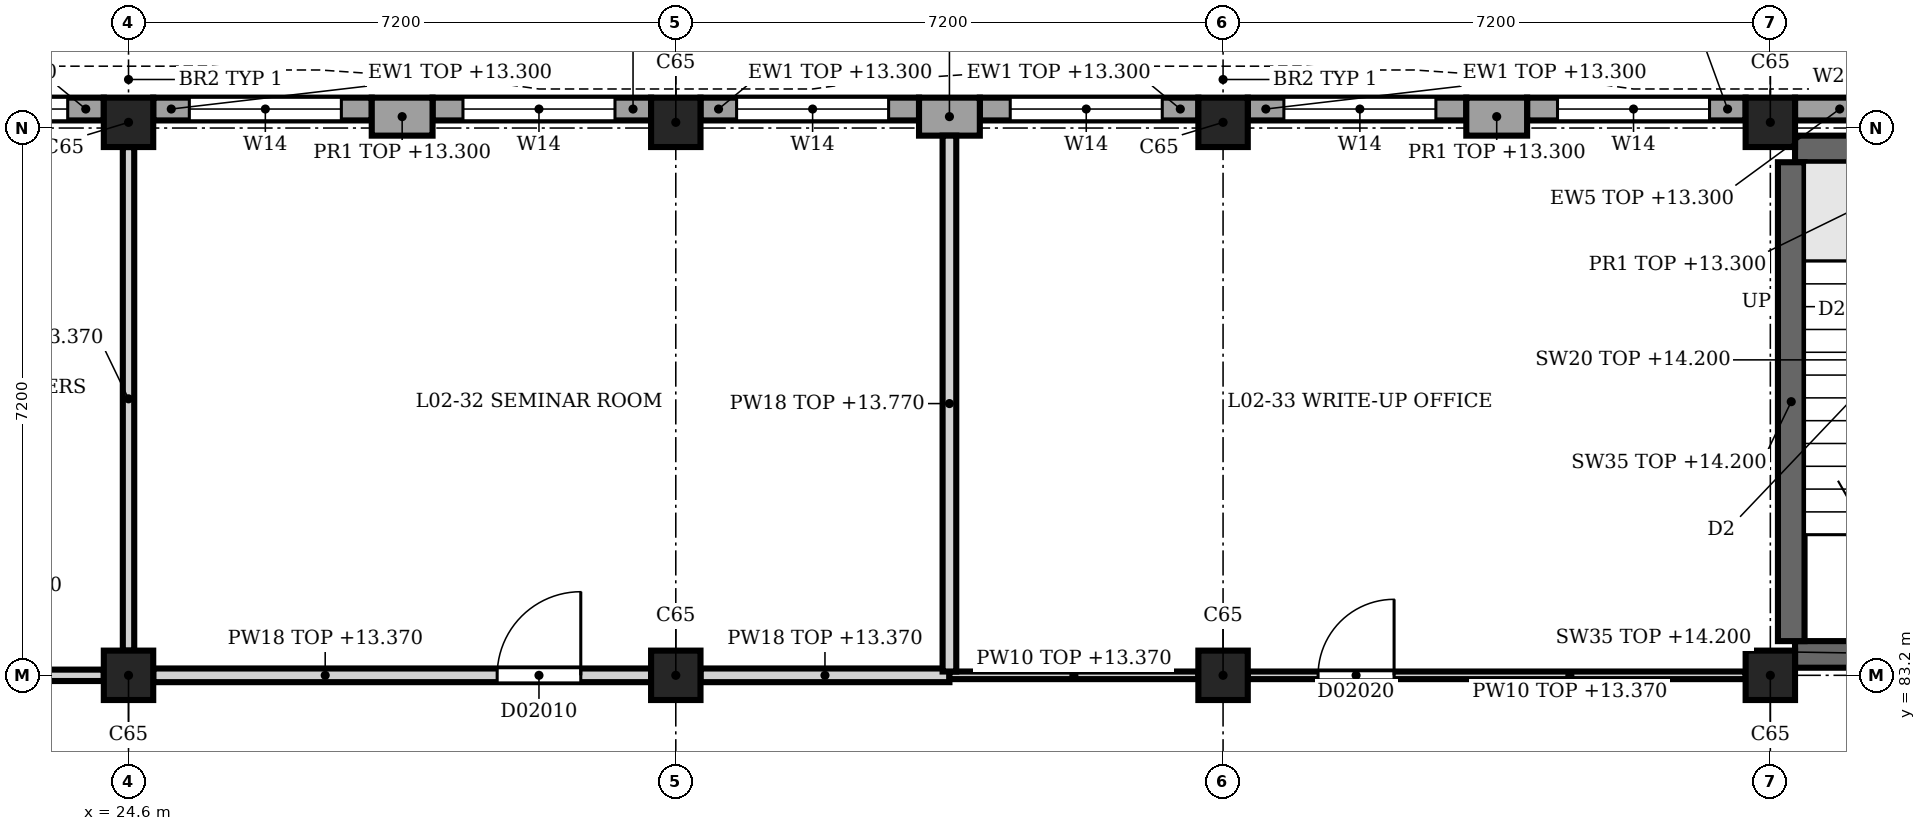
"""IFC4 building model, lengths in metres.
Left out: names, types, materials, properties, quantities, classifications, styles, units other than length and angle.
Written with IfcOpenShell. Run it as: python <this file> out.ifc"""

import sys

from ifc_helpers import new_model, si_unit, direction, frame, frame_2d, origin, origin_2d, place, context, subcontext, project, spatial, rectangle, extrude, element, fill, save


model = new_model("IFC4")
c1 = context("Model", 3, precision=1e-05, world=origin(), true_north=direction((0.0, 1.0)))
c2 = subcontext(c1, "Body", "Model", "MODEL_VIEW")
j1 = project(units=[si_unit("LENGTHUNIT", "METRE"), si_unit("PLANEANGLEUNIT", "RADIAN")], contexts=[c1])
p1 = place(None, origin())
s1 = spatial("IfcSite", under=j1, at=p1, CompositionType="ELEMENT")
p2 = place(p1, origin())
s2 = spatial("IfcBuilding", under=s1, at=p2, CompositionType="ELEMENT")
p3 = place(p2, frame((0.0, 0.0, 9.9)))
s3 = spatial("IfcBuildingStorey", under=s2, at=p3, CompositionType="ELEMENT", Elevation=9.9)
for number, where, z_axis, x_axis in (
    (1, (24.6, 83.2, 0.0), (0.0, 0.0, 1.0), (1.0, 0.0, 0.0)),
    (2, (24.6, 90.475, 0.0), (0.0, 0.0, 1.0), (1.0, 0.0, 0.0)),
    (3, (31.8, 83.2, 0.0), (0.0, 0.0, 1.0), (1.0, 0.0, 0.0)),
    (4, (31.8, 90.475, 0.0), (0.0, 0.0, 1.0), (1.0, 0.0, 0.0)),
    (5, (39.0, 83.2, 0.0), (0.0, 0.0, 1.0), (1.0, 0.0, 0.0)),
    (6, (39.0, 90.475, 0.0), (0.0, 0.0, 1.0), (1.0, 0.0, 0.0)),
    (7, (46.2, 83.2, 0.0), (0.0, 0.0, 1.0), (1.0, 0.0, 0.0)),
    (8, (46.2, 90.475, 0.0), (0.0, 0.0, 1.0), (1.0, 0.0, 0.0)),
):
    element("IfcColumn", number, at=place(p3, frame(where, z_axis=z_axis, x_axis=x_axis)), inside=s3, PredefinedType="COLUMN", context=c2, shape_type="SweptSolid", body=[
        extrude(rectangle(XDim=0.65, YDim=0.65, at=origin_2d()), origin(), (0.0, 0.0, 1.0), 4.5),
    ])
for number, where, z_axis, x_axis in (
    (9, (27.8, 90.55, 0.0), (0.0, 0.0, 1.0), (1.0, 0.0, 0.0)),
    (10, (35.0, 90.55, 0.0), (0.0, 0.0, 1.0), (1.0, 0.0, 0.0)),
    (11, (42.2, 90.55, 0.0), (0.0, 0.0, 1.0), (1.0, 0.0, 0.0)),
):
    element("IfcWall", number, at=place(p3, frame(where, z_axis=z_axis, x_axis=x_axis)), inside=s3, PredefinedType="SOLIDWALL", context=c2, shape_type="SweptSolid", body=[
        extrude(rectangle(XDim=0.8, YDim=0.5, at=frame_2d((0.4, 0.0))), origin(), (0.0, 0.0, 1.0), 3.4),
    ])
p4 = place(p3, frame((21.4, 90.65, 0.0), z_axis=(0.0, 0.0, 1.0), x_axis=(1.0, 0.0, 0.0)))
e12 = element("IfcWall", 12, at=p4, inside=s3, PredefinedType="SOLIDWALL", context=c2, shape_type="SweptSolid", body=[
    extrude(rectangle(XDim=2.875, YDim=0.3, at=frame_2d((1.438, 0.0))), origin(), (0.0, 0.0, 1.0), 3.4),
])
p5 = place(p4, frame((0.4, 0.0, 0.9)))
e13 = element("IfcOpeningElement", 13, at=p5, cuts=e12, PredefinedType="OPENING", context=c2, shape_type="SweptSolid", body=[
    extrude(rectangle(XDim=2.0, YDim=2.4, at=frame_2d((1.0, 1.2))), frame((0.0, 0.16, 0.0), z_axis=(0.0, -1.0, 0.0), x_axis=(1.0, 0.0, 0.0)), (0.0, 0.0, 1.0), 0.32),
])
p6 = place(p3, frame((24.925, 90.65, 0.0), z_axis=(0.0, 0.0, 1.0), x_axis=(1.0, 0.0, 0.0)))
e14 = element("IfcWall", 14, at=p6, inside=s3, PredefinedType="SOLIDWALL", context=c2, shape_type="SweptSolid", body=[
    extrude(rectangle(XDim=2.875, YDim=0.3, at=frame_2d((1.438, 0.0))), origin(), (0.0, 0.0, 1.0), 3.4),
])
p7 = place(p6, frame((0.475, 0.0, 0.9)))
e15 = element("IfcOpeningElement", 15, at=p7, cuts=e14, PredefinedType="OPENING", context=c2, shape_type="SweptSolid", body=[
    extrude(rectangle(XDim=2.0, YDim=2.4, at=frame_2d((1.0, 1.2))), frame((0.0, 0.16, 0.0), z_axis=(0.0, -1.0, 0.0), x_axis=(1.0, 0.0, 0.0)), (0.0, 0.0, 1.0), 0.32),
])
p8 = place(p3, frame((28.6, 90.65, 0.0), z_axis=(0.0, 0.0, 1.0), x_axis=(1.0, 0.0, 0.0)))
e16 = element("IfcWall", 16, at=p8, inside=s3, PredefinedType="SOLIDWALL", context=c2, shape_type="SweptSolid", body=[
    extrude(rectangle(XDim=2.875, YDim=0.3, at=frame_2d((1.438, 0.0))), origin(), (0.0, 0.0, 1.0), 3.4),
])
p9 = place(p8, frame((0.4, 0.0, 0.9)))
e17 = element("IfcOpeningElement", 17, at=p9, cuts=e16, PredefinedType="OPENING", context=c2, shape_type="SweptSolid", body=[
    extrude(rectangle(XDim=2.0, YDim=2.4, at=frame_2d((1.0, 1.2))), frame((0.0, 0.16, 0.0), z_axis=(0.0, -1.0, 0.0), x_axis=(1.0, 0.0, 0.0)), (0.0, 0.0, 1.0), 0.32),
])
p10 = place(p3, frame((32.125, 90.65, 0.0), z_axis=(0.0, 0.0, 1.0), x_axis=(1.0, 0.0, 0.0)))
e18 = element("IfcWall", 18, at=p10, inside=s3, PredefinedType="SOLIDWALL", context=c2, shape_type="SweptSolid", body=[
    extrude(rectangle(XDim=2.875, YDim=0.3, at=frame_2d((1.438, 0.0))), origin(), (0.0, 0.0, 1.0), 3.4),
])
p11 = place(p10, frame((0.475, 0.0, 0.9)))
e19 = element("IfcOpeningElement", 19, at=p11, cuts=e18, PredefinedType="OPENING", context=c2, shape_type="SweptSolid", body=[
    extrude(rectangle(XDim=2.0, YDim=2.4, at=frame_2d((1.0, 1.2))), frame((0.0, 0.16, 0.0), z_axis=(0.0, -1.0, 0.0), x_axis=(1.0, 0.0, 0.0)), (0.0, 0.0, 1.0), 0.32),
])
p12 = place(p3, frame((35.8, 90.65, 0.0), z_axis=(0.0, 0.0, 1.0), x_axis=(1.0, 0.0, 0.0)))
e20 = element("IfcWall", 20, at=p12, inside=s3, PredefinedType="SOLIDWALL", context=c2, shape_type="SweptSolid", body=[
    extrude(rectangle(XDim=2.875, YDim=0.3, at=frame_2d((1.438, 0.0))), origin(), (0.0, 0.0, 1.0), 3.4),
])
p13 = place(p12, frame((0.4, 0.0, 0.9)))
e21 = element("IfcOpeningElement", 21, at=p13, cuts=e20, PredefinedType="OPENING", context=c2, shape_type="SweptSolid", body=[
    extrude(rectangle(XDim=2.0, YDim=2.4, at=frame_2d((1.0, 1.2))), frame((0.0, 0.16, 0.0), z_axis=(0.0, -1.0, 0.0), x_axis=(1.0, 0.0, 0.0)), (0.0, 0.0, 1.0), 0.32),
])
p14 = place(p3, frame((39.325, 90.65, 0.0), z_axis=(0.0, 0.0, 1.0), x_axis=(1.0, 0.0, 0.0)))
e22 = element("IfcWall", 22, at=p14, inside=s3, PredefinedType="SOLIDWALL", context=c2, shape_type="SweptSolid", body=[
    extrude(rectangle(XDim=2.875, YDim=0.3, at=frame_2d((1.438, 0.0))), origin(), (0.0, 0.0, 1.0), 3.4),
])
p15 = place(p14, frame((0.475, 0.0, 0.9)))
e23 = element("IfcOpeningElement", 23, at=p15, cuts=e22, PredefinedType="OPENING", context=c2, shape_type="SweptSolid", body=[
    extrude(rectangle(XDim=2.0, YDim=2.4, at=frame_2d((1.0, 1.2))), frame((0.0, 0.16, 0.0), z_axis=(0.0, -1.0, 0.0), x_axis=(1.0, 0.0, 0.0)), (0.0, 0.0, 1.0), 0.32),
])
p16 = place(p3, frame((43.0, 90.65, 0.0), z_axis=(0.0, 0.0, 1.0), x_axis=(1.0, 0.0, 0.0)))
e24 = element("IfcWall", 24, at=p16, inside=s3, PredefinedType="SOLIDWALL", context=c2, shape_type="SweptSolid", body=[
    extrude(rectangle(XDim=2.875, YDim=0.3, at=frame_2d((1.438, 0.0))), origin(), (0.0, 0.0, 1.0), 3.4),
])
p17 = place(p16, frame((0.4, 0.0, 0.9)))
e25 = element("IfcOpeningElement", 25, at=p17, cuts=e24, PredefinedType="OPENING", context=c2, shape_type="SweptSolid", body=[
    extrude(rectangle(XDim=2.0, YDim=2.4, at=frame_2d((1.0, 1.2))), frame((0.0, 0.16, 0.0), z_axis=(0.0, -1.0, 0.0), x_axis=(1.0, 0.0, 0.0)), (0.0, 0.0, 1.0), 0.32),
])
p18 = place(p3, frame((46.525, 90.65, 0.0), z_axis=(0.0, 0.0, 1.0), x_axis=(1.0, 0.0, 0.0)))
e26 = element("IfcWall", 26, at=p18, inside=s3, PredefinedType="SOLIDWALL", context=c2, shape_type="SweptSolid", body=[
    extrude(rectangle(XDim=2.875, YDim=0.3, at=frame_2d((1.438, 0.0))), origin(), (0.0, 0.0, 1.0), 3.4),
])
p19 = place(p18, frame((1.175, 0.0, 1.2)))
e27 = element("IfcOpeningElement", 27, at=p19, cuts=e26, PredefinedType="OPENING", context=c2, shape_type="SweptSolid", body=[
    extrude(rectangle(XDim=0.6, YDim=1.8, at=frame_2d((0.3, 0.9))), frame((0.0, 0.16, 0.0), z_axis=(0.0, -1.0, 0.0), x_axis=(1.0, 0.0, 0.0)), (0.0, 0.0, 1.0), 0.32),
])
p20 = place(p3, frame((46.525, 83.475, 0.0), z_axis=(0.0, 0.0, 1.0), x_axis=(1.0, 0.0, 0.0)))
e28 = element("IfcWall", 28, at=p20, inside=s3, PredefinedType="SHEAR", context=c2, shape_type="SweptSolid", body=[
    extrude(rectangle(XDim=6.55, YDim=0.35, at=frame_2d((3.275, 0.0))), origin(), (0.0, 0.0, 1.0), 4.3),
])
p21 = place(p20, frame((3.875, 0.0, 0.0)))
e29 = element("IfcOpeningElement", 29, at=p21, cuts=e28, PredefinedType="OPENING", context=c2, shape_type="SweptSolid", body=[
    extrude(rectangle(XDim=1.2, YDim=2.1, at=frame_2d((0.6, 1.05))), frame((0.0, 0.185, 0.0), z_axis=(0.0, -1.0, 0.0), x_axis=(1.0, 0.0, 0.0)), (0.0, 0.0, 1.0), 0.37),
])
p22 = place(p3, frame((46.525, 90.125, 0.0), z_axis=(0.0, 0.0, 1.0), x_axis=(1.0, 0.0, 0.0)))
e30 = element("IfcWall", 30, at=p22, inside=s3, PredefinedType="SHEAR", context=c2, shape_type="SweptSolid", body=[
    extrude(rectangle(XDim=6.55, YDim=0.35, at=frame_2d((3.275, 0.0))), origin(), (0.0, 0.0, 1.0), 4.3),
])
p23 = place(p22, frame((1.175, 0.0, 1.2)))
e31 = element("IfcOpeningElement", 31, at=p23, cuts=e30, PredefinedType="OPENING", context=c2, shape_type="SweptSolid", body=[
    extrude(rectangle(XDim=0.6, YDim=1.8, at=frame_2d((0.3, 0.9))), frame((0.0, 0.185, 0.0), z_axis=(0.0, -1.0, 0.0), x_axis=(1.0, 0.0, 0.0)), (0.0, 0.0, 1.0), 0.37),
])
p24 = place(p3, frame((46.475, 83.65, 0.0), z_axis=(0.0, 0.0, 1.0), x_axis=(0.0, 1.0, 0.0)))
e32 = element("IfcWall", 32, at=p24, inside=s3, PredefinedType="SHEAR", context=c2, shape_type="SweptSolid", body=[
    extrude(rectangle(XDim=6.3, YDim=0.35, at=frame_2d((3.15, 0.0))), origin(), (0.0, 0.0, 1.0), 4.3),
])
p25 = place(p3, frame((21.0, 83.2, 0.0), z_axis=(0.0, 0.0, 1.0), x_axis=(1.0, 0.0, 0.0)))
e33 = element("IfcWall", 33, at=p25, inside=s3, PredefinedType="PARTITIONING", context=c2, shape_type="SweptSolid", body=[
    extrude(rectangle(XDim=3.275, YDim=0.15, at=frame_2d((1.637, 0.0))), origin(), (0.0, 0.0, 1.0), 3.47),
])
p26 = place(p25, frame((1.35, 0.0, 0.0)))
e34 = element("IfcOpeningElement", 34, at=p26, cuts=e33, PredefinedType="OPENING", context=c2, shape_type="SweptSolid", body=[
    extrude(rectangle(XDim=0.85, YDim=2.1, at=frame_2d((0.425, 1.05))), frame((0.0, 0.085, 0.0), z_axis=(0.0, -1.0, 0.0), x_axis=(1.0, 0.0, 0.0)), (0.0, 0.0, 1.0), 0.17),
])
p27 = place(p3, frame((24.925, 83.2, 0.0), z_axis=(0.0, 0.0, 1.0), x_axis=(1.0, 0.0, 0.0)))
e35 = element("IfcWall", 35, at=p27, inside=s3, PredefinedType="PARTITIONING", context=c2, shape_type="SweptSolid", body=[
    extrude(rectangle(XDim=6.55, YDim=0.18, at=frame_2d((3.275, 0.0))), origin(), (0.0, 0.0, 1.0), 3.47),
])
p28 = place(p27, frame((4.525, 0.0, 0.0)))
e36 = element("IfcOpeningElement", 36, at=p28, cuts=e35, PredefinedType="OPENING", context=c2, shape_type="SweptSolid", body=[
    extrude(rectangle(XDim=1.1, YDim=2.3, at=frame_2d((0.55, 1.15))), frame((0.0, 0.1, 0.0), z_axis=(0.0, -1.0, 0.0), x_axis=(1.0, 0.0, 0.0)), (0.0, 0.0, 1.0), 0.2),
])
p29 = place(p3, frame((32.125, 83.2, 0.0), z_axis=(0.0, 0.0, 1.0), x_axis=(1.0, 0.0, 0.0)))
e37 = element("IfcWall", 37, at=p29, inside=s3, PredefinedType="PARTITIONING", context=c2, shape_type="SweptSolid", body=[
    extrude(rectangle(XDim=3.275, YDim=0.18, at=frame_2d((1.637, 0.0))), origin(), (0.0, 0.0, 1.0), 3.47),
])
p30 = place(p3, frame((35.4, 83.2, 0.0), z_axis=(0.0, 0.0, 1.0), x_axis=(1.0, 0.0, 0.0)))
e38 = element("IfcWall", 38, at=p30, inside=s3, PredefinedType="PARTITIONING", context=c2, shape_type="SweptSolid", body=[
    extrude(rectangle(XDim=3.275, YDim=0.1, at=frame_2d((1.638, 0.0))), origin(), (0.0, 0.0, 1.0), 3.47),
])
p31 = place(p3, frame((39.325, 83.2, 0.0), z_axis=(0.0, 0.0, 1.0), x_axis=(1.0, 0.0, 0.0)))
e39 = element("IfcWall", 39, at=p31, inside=s3, PredefinedType="PARTITIONING", context=c2, shape_type="SweptSolid", body=[
    extrude(rectangle(XDim=6.55, YDim=0.1, at=frame_2d((3.275, 0.0))), origin(), (0.0, 0.0, 1.0), 3.47),
])
p32 = place(p31, frame((0.925, 0.0, 0.0)))
e40 = element("IfcOpeningElement", 40, at=p32, cuts=e39, PredefinedType="OPENING", context=c2, shape_type="SweptSolid", body=[
    extrude(rectangle(XDim=1.0, YDim=2.1, at=frame_2d((0.5, 1.05))), frame((0.0, 0.06, 0.0), z_axis=(0.0, -1.0, 0.0), x_axis=(1.0, 0.0, 0.0)), (0.0, 0.0, 1.0), 0.12),
])
p33 = place(p3, frame((24.6, 83.525, 0.0), z_axis=(0.0, 0.0, 1.0), x_axis=(0.0, 1.0, 0.0)))
e41 = element("IfcWall", 41, at=p33, inside=s3, PredefinedType="PARTITIONING", context=c2, shape_type="SweptSolid", body=[
    extrude(rectangle(XDim=6.625, YDim=0.15, at=frame_2d((3.312, 0.0))), origin(), (0.0, 0.0, 1.0), 3.47),
])
p34 = place(p3, frame((35.4, 83.25, 0.0), z_axis=(0.0, 0.0, 1.0), x_axis=(0.0, 1.0, 0.0)))
e42 = element("IfcWall", 42, at=p34, inside=s3, PredefinedType="PARTITIONING", context=c2, shape_type="SweptSolid", body=[
    extrude(rectangle(XDim=7.05, YDim=0.18, at=frame_2d((3.525, 0.0))), origin(), (0.0, 0.0, 1.0), 3.87),
])
p35 = place(p5, origin())
e43 = element("IfcWindow", 43, at=p35, inside=s3, PartitioningType="SINGLE_PANEL", PredefinedType="WINDOW", context=c2, shape_type="SweptSolid", body=[
    extrude(rectangle(XDim=2.0, YDim=2.4, at=frame_2d((1.0, 1.2))), frame((0.0, 0.03, 0.0), z_axis=(0.0, -1.0, 0.0), x_axis=(1.0, 0.0, 0.0)), (0.0, 0.0, 1.0), 0.06),
])
fill(e13, e43)
p36 = place(p7, origin())
e44 = element("IfcWindow", 44, at=p36, inside=s3, PartitioningType="SINGLE_PANEL", PredefinedType="WINDOW", context=c2, shape_type="SweptSolid", body=[
    extrude(rectangle(XDim=2.0, YDim=2.4, at=frame_2d((1.0, 1.2))), frame((0.0, 0.03, 0.0), z_axis=(0.0, -1.0, 0.0), x_axis=(1.0, 0.0, 0.0)), (0.0, 0.0, 1.0), 0.06),
])
fill(e15, e44)
p37 = place(p9, origin())
e45 = element("IfcWindow", 45, at=p37, inside=s3, PartitioningType="SINGLE_PANEL", PredefinedType="WINDOW", context=c2, shape_type="SweptSolid", body=[
    extrude(rectangle(XDim=2.0, YDim=2.4, at=frame_2d((1.0, 1.2))), frame((0.0, 0.03, 0.0), z_axis=(0.0, -1.0, 0.0), x_axis=(1.0, 0.0, 0.0)), (0.0, 0.0, 1.0), 0.06),
])
fill(e17, e45)
p38 = place(p11, origin())
e46 = element("IfcWindow", 46, at=p38, inside=s3, PartitioningType="SINGLE_PANEL", PredefinedType="WINDOW", context=c2, shape_type="SweptSolid", body=[
    extrude(rectangle(XDim=2.0, YDim=2.4, at=frame_2d((1.0, 1.2))), frame((0.0, 0.03, 0.0), z_axis=(0.0, -1.0, 0.0), x_axis=(1.0, 0.0, 0.0)), (0.0, 0.0, 1.0), 0.06),
])
fill(e19, e46)
p39 = place(p13, origin())
e47 = element("IfcWindow", 47, at=p39, inside=s3, PartitioningType="SINGLE_PANEL", PredefinedType="WINDOW", context=c2, shape_type="SweptSolid", body=[
    extrude(rectangle(XDim=2.0, YDim=2.4, at=frame_2d((1.0, 1.2))), frame((0.0, 0.03, 0.0), z_axis=(0.0, -1.0, 0.0), x_axis=(1.0, 0.0, 0.0)), (0.0, 0.0, 1.0), 0.06),
])
fill(e21, e47)
p40 = place(p15, origin())
e48 = element("IfcWindow", 48, at=p40, inside=s3, PartitioningType="SINGLE_PANEL", PredefinedType="WINDOW", context=c2, shape_type="SweptSolid", body=[
    extrude(rectangle(XDim=2.0, YDim=2.4, at=frame_2d((1.0, 1.2))), frame((0.0, 0.03, 0.0), z_axis=(0.0, -1.0, 0.0), x_axis=(1.0, 0.0, 0.0)), (0.0, 0.0, 1.0), 0.06),
])
fill(e23, e48)
p41 = place(p17, origin())
e49 = element("IfcWindow", 49, at=p41, inside=s3, PartitioningType="SINGLE_PANEL", PredefinedType="WINDOW", context=c2, shape_type="SweptSolid", body=[
    extrude(rectangle(XDim=2.0, YDim=2.4, at=frame_2d((1.0, 1.2))), frame((0.0, 0.03, 0.0), z_axis=(0.0, -1.0, 0.0), x_axis=(1.0, 0.0, 0.0)), (0.0, 0.0, 1.0), 0.06),
])
fill(e25, e49)
p42 = place(p28, origin())
e50 = element("IfcDoor", 50, at=p42, inside=s3, OperationType="SINGLE_SWING_RIGHT", PredefinedType="DOOR", context=c2, shape_type="SweptSolid", body=[
    extrude(rectangle(XDim=1.1, YDim=2.3, at=frame_2d((0.55, 1.15))), frame((0.0, 0.025, 0.0), z_axis=(0.0, -1.0, 0.0), x_axis=(1.0, 0.0, 0.0)), (0.0, 0.0, 1.0), 0.05),
])
fill(e36, e50)
p43 = place(p32, origin())
e51 = element("IfcDoor", 51, at=p43, inside=s3, OperationType="SINGLE_SWING_LEFT", PredefinedType="DOOR", context=c2, shape_type="SweptSolid", body=[
    extrude(rectangle(XDim=1.0, YDim=2.1, at=frame_2d((0.5, 1.05))), frame((0.0, 0.025, 0.0), z_axis=(0.0, -1.0, 0.0), x_axis=(1.0, 0.0, 0.0)), (0.0, 0.0, 1.0), 0.05),
])
fill(e40, e51)
save(model, sys.argv[1])
